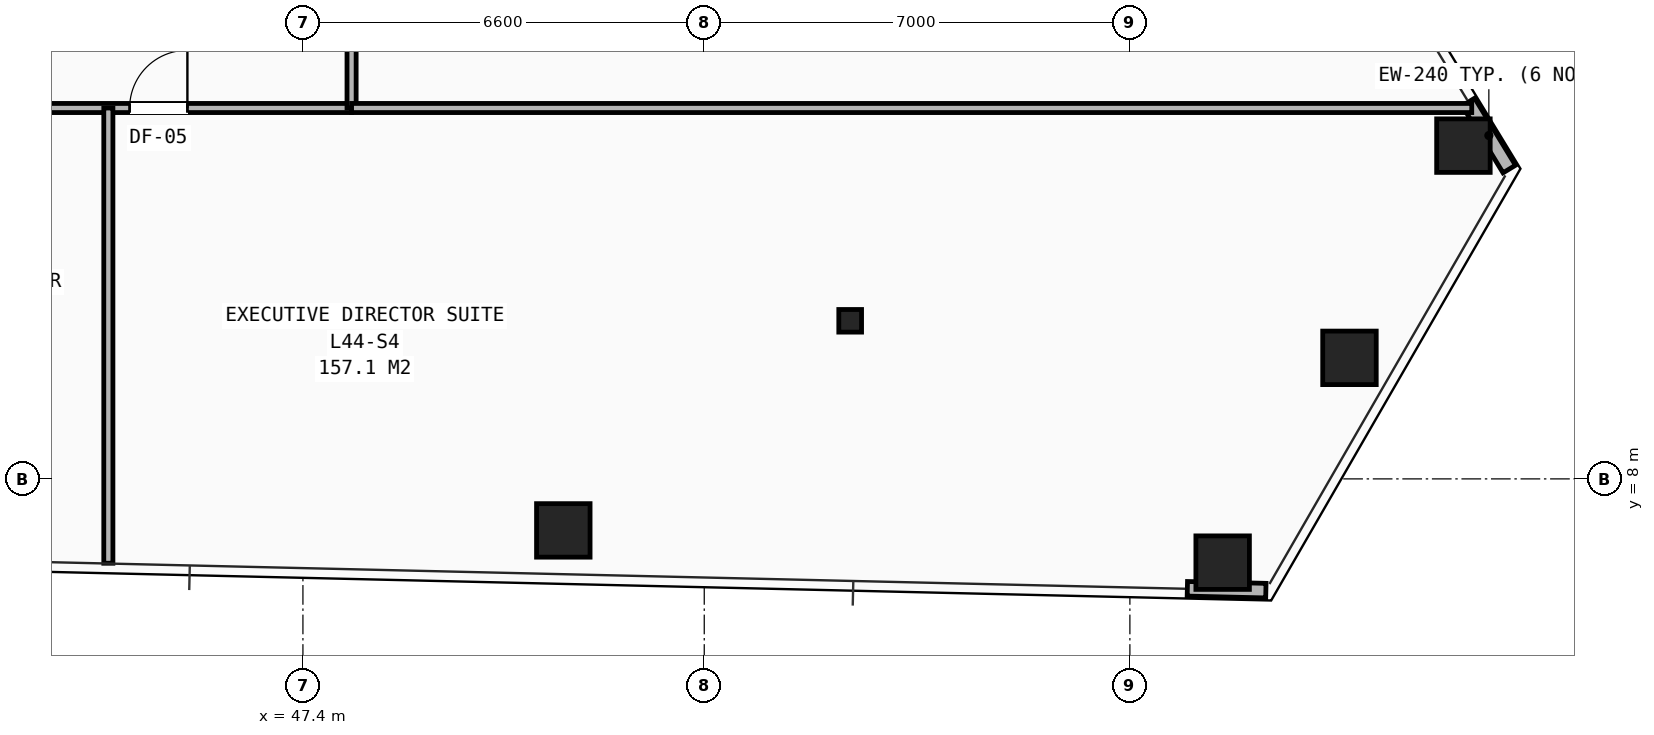
"""IFC4 building model, lengths in metres.
Left out: names, types, materials, properties, quantities, classifications, styles, units other than length and angle.
Written with IfcOpenShell. Run it as: python <this file> out.ifc"""

import sys

from ifc_helpers import new_model, si_unit, direction, frame, frame_2d, origin, origin_2d, place, context, subcontext, project, spatial, rectangle, hollow_rectangle, i_section, extrude, element, fill, save


model = new_model("IFC4")
c1 = context("Model", 3, precision=1e-05, world=origin(), true_north=direction((0.0, 1.0)))
c2 = subcontext(c1, "Body", "Model", "MODEL_VIEW")
j1 = project(units=[si_unit("LENGTHUNIT", "METRE"), si_unit("PLANEANGLEUNIT", "RADIAN")], contexts=[c1])
p1 = place(None, origin())
s1 = spatial("IfcSite", under=j1, at=p1, CompositionType="ELEMENT")
p2 = place(p1, origin())
s2 = spatial("IfcBuilding", under=s1, at=p2, CompositionType="ELEMENT")
p3 = place(p2, frame((0.0, 0.0, 153.95)))
s3 = spatial("IfcBuildingStorey", under=s2, at=p3, CompositionType="ELEMENT", Elevation=153.95)
p4 = place(p3, frame((56.4, 10.6, 0.0), z_axis=(0.0, 0.0, 1.0), x_axis=(1.0, 0.0, 0.0)))
e1 = element("IfcColumn", 1, at=p4, inside=s3, PredefinedType="COLUMN", context=c2, shape_type="SweptSolid", body=[
    extrude(i_section(OverallWidth=0.374, OverallDepth=0.372, WebThickness=0.016, FlangeThickness=0.026, at=origin_2d()), origin(), (0.0, 0.0, 1.0), 3.45),
])
for number, where, z_axis, x_axis in (
    (2, (51.682, 7.153, 0.0), (0.0, 0.0, 1.0), (1.0, 0.0, 0.0)),
    (3, (62.525, 6.623, 0.0), (0.0, 0.0, 1.0), (1.0, 0.0, 0.0)),
    (4, (64.611, 9.991, 0.0), (0.0, 0.0, 1.0), (1.0, 0.0, 0.0)),
    (5, (66.485, 13.481, 0.0), (0.0, 0.0, 1.0), (1.0, 0.0, 0.0)),
):
    element("IfcColumn", number, at=place(p3, frame(where, z_axis=z_axis, x_axis=x_axis)), inside=s3, PredefinedType="COLUMN", context=c2, shape_type="SweptSolid", body=[
        extrude(hollow_rectangle(XDim=0.88, YDim=0.88, WallThickness=0.06, at=origin_2d()), origin(), (0.0, 0.0, 1.0), 3.45),
    ])
for number, where, z_axis, x_axis in (
    (6, (61.945, 6.192, 0.0), (0.0, 0.0, 1.0), (1.0, -0.023, 0.0)),
    (7, (67.239, 13.096, 0.0), (0.0, 0.0, 1.0), (-0.52, 0.854, 0.0)),
):
    element("IfcWall", number, at=place(p3, frame(where, z_axis=z_axis, x_axis=x_axis)), inside=s3, PredefinedType="SHEAR", context=c2, shape_type="SweptSolid", body=[
        extrude(rectangle(XDim=1.292, YDim=0.24, at=frame_2d((0.646, 0.0))), origin(), (0.0, 0.0, 1.0), 2.523),
    ])
p5 = place(p3, frame((29.6, 14.1, 0.0), z_axis=(0.0, 0.0, 1.0), x_axis=(1.0, 0.0, 0.0)))
e8 = element("IfcWall", 8, at=p5, inside=s3, PredefinedType="PARTITIONING", context=c2, shape_type="SweptSolid", body=[
    extrude(rectangle(XDim=18.6, YDim=0.15, at=frame_2d((9.3, 0.0))), origin(), (0.0, 0.0, 1.0), 2.165),
])
p6 = place(p5, frame((0.55, 0.0, 0.0)))
e9 = element("IfcOpeningElement", 9, at=p6, cuts=e8, PredefinedType="OPENING", context=c2, shape_type="SweptSolid", body=[
    extrude(rectangle(XDim=0.95, YDim=2.1, at=frame_2d((0.475, 1.05))), frame((0.0, 0.085, 0.0), z_axis=(0.0, -1.0, 0.0), x_axis=(1.0, 0.0, 0.0)), (0.0, 0.0, 1.0), 0.17),
])
p7 = place(p5, frame((4.75, 0.0, 0.0)))
e10 = element("IfcOpeningElement", 10, at=p7, cuts=e8, PredefinedType="OPENING", context=c2, shape_type="SweptSolid", body=[
    extrude(rectangle(XDim=0.95, YDim=2.1, at=frame_2d((0.475, 1.05))), frame((0.0, 0.085, 0.0), z_axis=(0.0, -1.0, 0.0), x_axis=(1.0, 0.0, 0.0)), (0.0, 0.0, 1.0), 0.17),
])
p8 = place(p5, frame((9.95, 0.0, 0.0)))
e11 = element("IfcOpeningElement", 11, at=p8, cuts=e8, PredefinedType="OPENING", context=c2, shape_type="SweptSolid", body=[
    extrude(rectangle(XDim=0.95, YDim=2.1, at=frame_2d((0.475, 1.05))), frame((0.0, 0.085, 0.0), z_axis=(0.0, -1.0, 0.0), x_axis=(1.0, 0.0, 0.0)), (0.0, 0.0, 1.0), 0.17),
])
p9 = place(p5, frame((14.95, 0.0, 0.0)))
e12 = element("IfcOpeningElement", 12, at=p9, cuts=e8, PredefinedType="OPENING", context=c2, shape_type="SweptSolid", body=[
    extrude(rectangle(XDim=0.95, YDim=2.1, at=frame_2d((0.475, 1.05))), frame((0.0, 0.085, 0.0), z_axis=(0.0, -1.0, 0.0), x_axis=(1.0, 0.0, 0.0)), (0.0, 0.0, 1.0), 0.17),
])
p10 = place(p3, frame((48.2, 14.1, 0.0), z_axis=(0.0, 0.0, 1.0), x_axis=(0.0, 1.0, 0.0)))
e13 = element("IfcWall", 13, at=p10, inside=s3, PredefinedType="PARTITIONING", context=c2, shape_type="SweptSolid", body=[
    extrude(rectangle(XDim=2.3, YDim=0.15, at=frame_2d((1.15, 0.0))), origin(), (0.0, 0.0, 1.0), 2.601),
])
p11 = place(p3, frame((44.2, 6.613, 0.0), z_axis=(0.0, 0.0, 1.0), x_axis=(0.0, 1.0, 0.0)))
e14 = element("IfcWall", 14, at=p11, inside=s3, PredefinedType="PARTITIONING", context=c2, shape_type="SweptSolid", body=[
    extrude(rectangle(XDim=7.487, YDim=0.15, at=frame_2d((3.744, 0.0))), origin(), (0.0, 0.0, 1.0), 2.529),
])
p12 = place(p3, frame((48.2, 14.1, 0.0), z_axis=(0.0, 0.0, 1.0), x_axis=(1.0, 0.0, 0.0)))
e15 = element("IfcWall", 15, at=p12, inside=s3, PredefinedType="PARTITIONING", context=c2, shape_type="SweptSolid", body=[
    extrude(rectangle(XDim=18.422, YDim=0.15, at=frame_2d((9.211, 0.0))), origin(), (0.0, 0.0, 1.0), 2.529),
])
p13 = place(p9, origin())
e16 = element("IfcDoor", 16, at=p13, inside=s3, OperationType="SINGLE_SWING_RIGHT", PredefinedType="DOOR", context=c2, shape_type="SweptSolid", body=[
    extrude(rectangle(XDim=0.95, YDim=2.1, at=frame_2d((0.475, 1.05))), frame((0.0, 0.025, 0.0), z_axis=(0.0, -1.0, 0.0), x_axis=(1.0, 0.0, 0.0)), (0.0, 0.0, 1.0), 0.05),
])
fill(e12, e16)
save(model, sys.argv[1])
